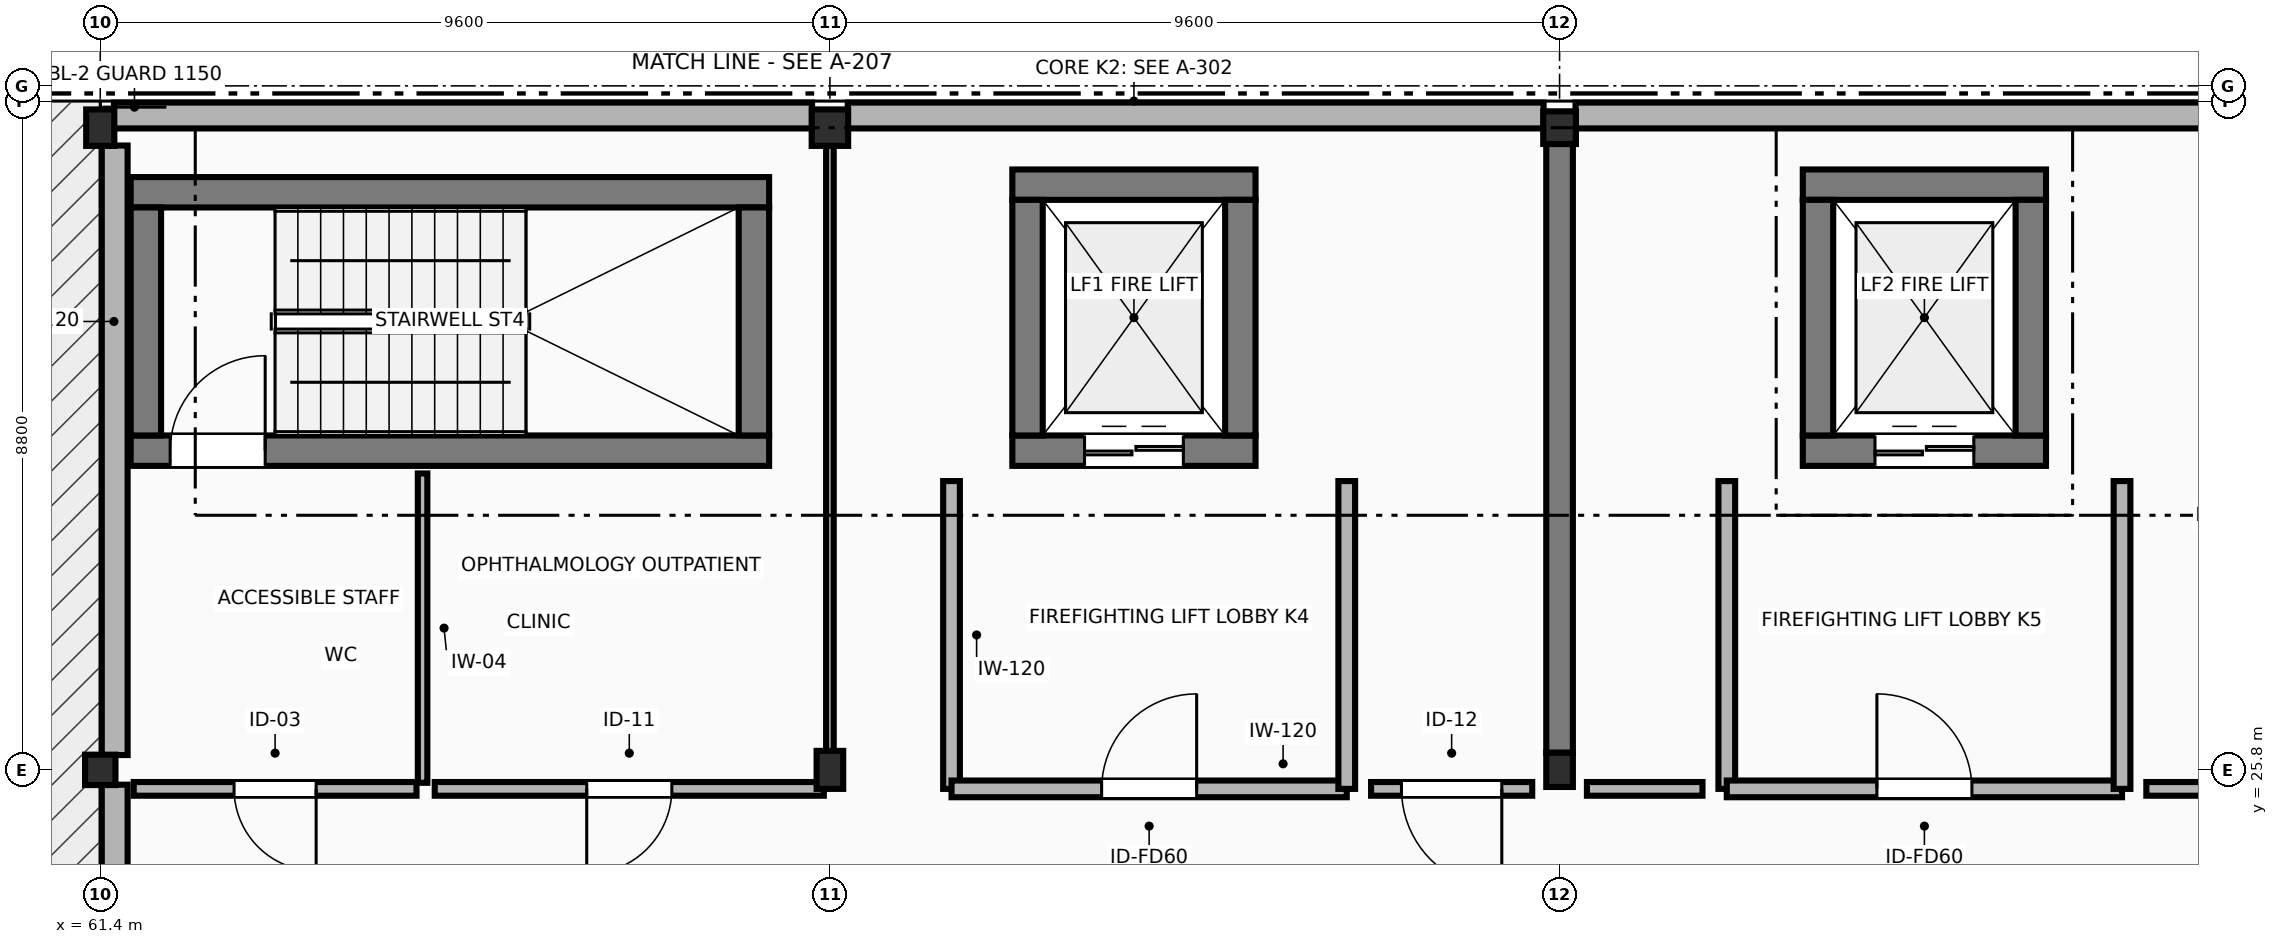
"""IFC4 building model, lengths in metres.
Left out: names, types, materials, properties, quantities, classifications, styles, units other than length and angle.
Written with IfcOpenShell. Run it as: python <this file> out.ifc"""

import sys

from ifc_helpers import new_model, si_unit, direction, frame, frame_2d, origin, origin_2d, place, context, subcontext, project, spatial, rectangle, extrude, element, fill, save


model = new_model("IFC4")
c1 = context("Model", 3, precision=1e-05, world=origin(), true_north=direction((0.0, 1.0)))
c2 = subcontext(c1, "Body", "Model", "MODEL_VIEW")
j1 = project(units=[si_unit("LENGTHUNIT", "METRE"), si_unit("PLANEANGLEUNIT", "RADIAN")], contexts=[c1])
p1 = place(None, origin())
s1 = spatial("IfcSite", under=j1, at=p1, CompositionType="ELEMENT")
p2 = place(p1, origin())
s2 = spatial("IfcBuilding", under=s1, at=p2, CompositionType="ELEMENT")
p3 = place(p2, frame((0.0, 0.0, 13.8)))
s3 = spatial("IfcBuildingStorey", under=s2, at=p3, CompositionType="ELEMENT", Elevation=13.8)
p4 = place(p3, frame((61.4, 25.8, 0.0), z_axis=(0.0, 0.0, 1.0), x_axis=(1.0, 0.0, 0.0)))
e1 = element("IfcColumn", 1, at=p4, inside=s3, PredefinedType="COLUMN", context=c2, shape_type="SweptSolid", body=[
    extrude(rectangle(XDim=0.4, YDim=0.4, at=origin_2d()), origin(), (0.0, 0.0, 1.0), 4.2),
])
p5 = place(p3, frame((61.4, 34.25, 0.0), z_axis=(0.0, 0.0, 1.0), x_axis=(1.0, 0.0, 0.0)))
e2 = element("IfcColumn", 2, at=p5, inside=s3, PredefinedType="COLUMN", context=c2, shape_type="SweptSolid", body=[
    extrude(rectangle(XDim=0.37, YDim=0.48, at=origin_2d()), origin(), (0.0, 0.0, 1.0), 4.2),
])
p6 = place(p3, frame((71.0, 25.8, 0.0), z_axis=(0.0, 0.0, 1.0), x_axis=(1.0, 0.0, 0.0)))
e3 = element("IfcColumn", 3, at=p6, inside=s3, PredefinedType="COLUMN", context=c2, shape_type="SweptSolid", body=[
    extrude(rectangle(XDim=0.35, YDim=0.5, at=origin_2d()), origin(), (0.0, 0.0, 1.0), 4.2),
])
p7 = place(p3, frame((71.0, 34.25, 0.0), z_axis=(0.0, 0.0, 1.0), x_axis=(1.0, 0.0, 0.0)))
e4 = element("IfcColumn", 4, at=p7, inside=s3, PredefinedType="COLUMN", context=c2, shape_type="SweptSolid", body=[
    extrude(rectangle(XDim=0.48, YDim=0.48, at=origin_2d()), origin(), (0.0, 0.0, 1.0), 4.2),
])
p8 = place(p3, frame((80.6, 25.8, 0.0), z_axis=(0.0, 0.0, 1.0), x_axis=(1.0, 0.0, 0.0)))
e5 = element("IfcColumn", 5, at=p8, inside=s3, PredefinedType="COLUMN", context=c2, shape_type="SweptSolid", body=[
    extrude(rectangle(XDim=0.35, YDim=0.45, at=origin_2d()), origin(), (0.0, 0.0, 1.0), 4.2),
])
p9 = place(p3, frame((80.6, 34.25, 0.0), z_axis=(0.0, 0.0, 1.0), x_axis=(1.0, 0.0, 0.0)))
e6 = element("IfcColumn", 6, at=p9, inside=s3, PredefinedType="COLUMN", context=c2, shape_type="SweptSolid", body=[
    extrude(rectangle(XDim=0.43, YDim=0.43, at=origin_2d()), origin(), (0.0, 0.0, 1.0), 4.2),
])
p10 = place(p3, frame((90.015, 34.41, 0.0), z_axis=(0.0, 0.0, 1.0), x_axis=(-1.0, 0.0, 0.0)))
e7 = element("IfcWall", 7, at=p10, inside=s3, PredefinedType="STANDARD", context=c2, shape_type="SweptSolid", body=[
    extrude(rectangle(XDim=9.205, YDim=0.34, at=frame_2d((4.603, 0.0))), origin(), (0.0, 0.0, 1.0), 3.185),
])
p11 = place(p3, frame((80.39, 34.41, 0.0), z_axis=(0.0, 0.0, 1.0), x_axis=(-1.0, 0.0, 0.0)))
e8 = element("IfcWall", 8, at=p11, inside=s3, PredefinedType="STANDARD", context=c2, shape_type="SweptSolid", body=[
    extrude(rectangle(XDim=9.155, YDim=0.34, at=frame_2d((4.577, 0.0))), origin(), (0.0, 0.0, 1.0), 3.185),
])
p12 = place(p3, frame((70.765, 34.41, 0.0), z_axis=(0.0, 0.0, 1.0), x_axis=(-1.0, 0.0, 0.0)))
e9 = element("IfcWall", 9, at=p12, inside=s3, PredefinedType="STANDARD", context=c2, shape_type="SweptSolid", body=[
    extrude(rectangle(XDim=9.185, YDim=0.34, at=frame_2d((4.592, 0.0))), origin(), (0.0, 0.0, 1.0), 3.185),
])
p13 = place(p3, frame((61.59, 34.015, 0.0), z_axis=(0.0, 0.0, 1.0), x_axis=(0.0, -1.0, 0.0)))
e10 = element("IfcWall", 10, at=p13, inside=s3, PredefinedType="STANDARD", context=c2, shape_type="SweptSolid", body=[
    extrude(rectangle(XDim=8.02, YDim=0.34, at=frame_2d((4.01, 0.0))), origin(), (0.0, 0.0, 1.0), 2.965),
])
p14 = place(p3, frame((61.59, 25.605, 0.0), z_axis=(0.0, 0.0, 1.0), x_axis=(0.0, -1.0, 0.0)))
e11 = element("IfcWall", 11, at=p14, inside=s3, PredefinedType="STANDARD", context=c2, shape_type="SweptSolid", body=[
    extrude(rectangle(XDim=8.22, YDim=0.34, at=frame_2d((4.11, 0.0))), origin(), (0.0, 0.0, 1.0), 2.965),
])
p15 = place(p3, frame((61.8, 30.0, 0.0), z_axis=(0.0, 0.0, 1.0), x_axis=(1.0, 0.0, 0.0)))
e12 = element("IfcWall", 12, at=p15, inside=s3, PredefinedType="SHEAR", context=c2, shape_type="SweptSolid", body=[
    extrude(rectangle(XDim=8.4, YDim=0.4, at=frame_2d((4.2, 0.0))), origin(), (0.0, 0.0, 1.0), 3.92),
])
p16 = place(p15, frame((0.52, 0.0, 0.0)))
e13 = element("IfcOpeningElement", 13, at=p16, cuts=e12, PredefinedType="OPENING", context=c2, shape_type="SweptSolid", body=[
    extrude(rectangle(XDim=1.25, YDim=2.2, at=frame_2d((0.625, 1.1))), frame((0.0, 0.21, 0.0), z_axis=(0.0, -1.0, 0.0), x_axis=(1.0, 0.0, 0.0)), (0.0, 0.0, 1.0), 0.42),
])
p17 = place(p3, frame((70.2, 33.4, 0.0), z_axis=(0.0, 0.0, 1.0), x_axis=(-1.0, 0.0, 0.0)))
e14 = element("IfcWall", 14, at=p17, inside=s3, PredefinedType="SHEAR", context=c2, shape_type="SweptSolid", body=[
    extrude(rectangle(XDim=8.4, YDim=0.4, at=frame_2d((4.2, 0.0))), origin(), (0.0, 0.0, 1.0), 3.92),
])
for number, where, z_axis, x_axis in (
    (15, (62.0, 30.2, 0.0), (0.0, 0.0, 1.0), (0.0, 1.0, 0.0)),
    (16, (70.0, 33.2, 0.0), (0.0, 0.0, 1.0), (0.0, -1.0, 0.0)),
):
    element("IfcWall", number, at=place(p3, frame(where, z_axis=z_axis, x_axis=x_axis)), inside=s3, PredefinedType="SHEAR", context=c2, shape_type="SweptSolid", body=[
        extrude(rectangle(XDim=3.0, YDim=0.4, at=frame_2d((1.5, 0.0))), origin(), (0.0, 0.0, 1.0), 3.92),
    ])
p18 = place(p3, frame((73.4, 30.0, 0.0), z_axis=(0.0, 0.0, 1.0), x_axis=(1.0, 0.0, 0.0)))
e17 = element("IfcWall", 17, at=p18, inside=s3, PredefinedType="SHEAR", context=c2, shape_type="SweptSolid", body=[
    extrude(rectangle(XDim=3.2, YDim=0.4, at=frame_2d((1.6, 0.0))), origin(), (0.0, 0.0, 1.0), 4.2),
])
p19 = place(p18, frame((0.95, 0.0, 0.0)))
e18 = element("IfcOpeningElement", 18, at=p19, cuts=e17, PredefinedType="OPENING", context=c2, shape_type="SweptSolid", body=[
    extrude(rectangle(XDim=1.3, YDim=2.25, at=frame_2d((0.65, 1.125))), frame((0.0, 0.21, 0.0), z_axis=(0.0, -1.0, 0.0), x_axis=(1.0, 0.0, 0.0)), (0.0, 0.0, 1.0), 0.42),
])
p20 = place(p3, frame((76.6, 33.5, 0.0), z_axis=(0.0, 0.0, 1.0), x_axis=(-1.0, 0.0, 0.0)))
e19 = element("IfcWall", 19, at=p20, inside=s3, PredefinedType="SHEAR", context=c2, shape_type="SweptSolid", body=[
    extrude(rectangle(XDim=3.2, YDim=0.4, at=frame_2d((1.6, 0.0))), origin(), (0.0, 0.0, 1.0), 4.2),
])
for number, where, z_axis, x_axis in (
    (20, (73.6, 30.2, 0.0), (0.0, 0.0, 1.0), (0.0, 1.0, 0.0)),
    (21, (76.4, 33.3, 0.0), (0.0, 0.0, 1.0), (0.0, -1.0, 0.0)),
):
    element("IfcWall", number, at=place(p3, frame(where, z_axis=z_axis, x_axis=x_axis)), inside=s3, PredefinedType="SHEAR", context=c2, shape_type="SweptSolid", body=[
        extrude(rectangle(XDim=3.1, YDim=0.4, at=frame_2d((1.55, 0.0))), origin(), (0.0, 0.0, 1.0), 4.2),
    ])
p21 = place(p3, frame((72.6, 29.6, 0.0), z_axis=(0.0, 0.0, 1.0), x_axis=(0.0, -1.0, 0.0)))
e22 = element("IfcWall", 22, at=p21, inside=s3, PredefinedType="PARTITIONING", context=c2, shape_type="SweptSolid", body=[
    extrude(rectangle(XDim=4.05, YDim=0.22, at=frame_2d((2.025, 0.0))), origin(), (0.0, 0.0, 1.0), 3.92),
])
p22 = place(p3, frame((72.6, 25.55, 0.0), z_axis=(0.0, 0.0, 1.0), x_axis=(1.0, 0.0, 0.0)))
e23 = element("IfcWall", 23, at=p22, inside=s3, PredefinedType="PARTITIONING", context=c2, shape_type="SweptSolid", body=[
    extrude(rectangle(XDim=5.2, YDim=0.22, at=frame_2d((2.6, 0.0))), origin(), (0.0, 0.0, 1.0), 3.225),
])
p23 = place(p22, frame((1.975, 0.0, 0.0)))
e24 = element("IfcOpeningElement", 24, at=p23, cuts=e23, PredefinedType="OPENING", context=c2, shape_type="SweptSolid", body=[
    extrude(rectangle(XDim=1.25, YDim=2.2, at=frame_2d((0.625, 1.1))), frame((0.0, 0.12, 0.0), z_axis=(0.0, -1.0, 0.0), x_axis=(1.0, 0.0, 0.0)), (0.0, 0.0, 1.0), 0.24),
])
p24 = place(p3, frame((77.8, 25.55, 0.0), z_axis=(0.0, 0.0, 1.0), x_axis=(0.0, 1.0, 0.0)))
e25 = element("IfcWall", 25, at=p24, inside=s3, PredefinedType="PARTITIONING", context=c2, shape_type="SweptSolid", body=[
    extrude(rectangle(XDim=4.05, YDim=0.22, at=frame_2d((2.025, 0.0))), origin(), (0.0, 0.0, 1.0), 3.643),
])
p25 = place(p3, frame((83.8, 30.0, 0.0), z_axis=(0.0, 0.0, 1.0), x_axis=(1.0, 0.0, 0.0)))
e26 = element("IfcWall", 26, at=p25, inside=s3, PredefinedType="SHEAR", context=c2, shape_type="SweptSolid", body=[
    extrude(rectangle(XDim=3.2, YDim=0.4, at=frame_2d((1.6, 0.0))), origin(), (0.0, 0.0, 1.0), 4.2),
])
p26 = place(p25, frame((0.95, 0.0, 0.0)))
e27 = element("IfcOpeningElement", 27, at=p26, cuts=e26, PredefinedType="OPENING", context=c2, shape_type="SweptSolid", body=[
    extrude(rectangle(XDim=1.3, YDim=2.25, at=frame_2d((0.65, 1.125))), frame((0.0, 0.21, 0.0), z_axis=(0.0, -1.0, 0.0), x_axis=(1.0, 0.0, 0.0)), (0.0, 0.0, 1.0), 0.42),
])
p27 = place(p3, frame((87.0, 33.5, 0.0), z_axis=(0.0, 0.0, 1.0), x_axis=(-1.0, 0.0, 0.0)))
e28 = element("IfcWall", 28, at=p27, inside=s3, PredefinedType="SHEAR", context=c2, shape_type="SweptSolid", body=[
    extrude(rectangle(XDim=3.2, YDim=0.4, at=frame_2d((1.6, 0.0))), origin(), (0.0, 0.0, 1.0), 4.2),
])
for number, where, z_axis, x_axis in (
    (29, (84.0, 30.2, 0.0), (0.0, 0.0, 1.0), (0.0, 1.0, 0.0)),
    (30, (86.8, 33.3, 0.0), (0.0, 0.0, 1.0), (0.0, -1.0, 0.0)),
):
    element("IfcWall", number, at=place(p3, frame(where, z_axis=z_axis, x_axis=x_axis)), inside=s3, PredefinedType="SHEAR", context=c2, shape_type="SweptSolid", body=[
        extrude(rectangle(XDim=3.1, YDim=0.4, at=frame_2d((1.55, 0.0))), origin(), (0.0, 0.0, 1.0), 4.2),
    ])
p28 = place(p3, frame((82.8, 29.6, 0.0), z_axis=(0.0, 0.0, 1.0), x_axis=(0.0, -1.0, 0.0)))
e31 = element("IfcWall", 31, at=p28, inside=s3, PredefinedType="PARTITIONING", context=c2, shape_type="SweptSolid", body=[
    extrude(rectangle(XDim=4.05, YDim=0.22, at=frame_2d((2.025, 0.0))), origin(), (0.0, 0.0, 1.0), 3.92),
])
p29 = place(p3, frame((82.8, 25.55, 0.0), z_axis=(0.0, 0.0, 1.0), x_axis=(1.0, 0.0, 0.0)))
e32 = element("IfcWall", 32, at=p29, inside=s3, PredefinedType="PARTITIONING", context=c2, shape_type="SweptSolid", body=[
    extrude(rectangle(XDim=5.2, YDim=0.22, at=frame_2d((2.6, 0.0))), origin(), (0.0, 0.0, 1.0), 3.225),
])
p30 = place(p29, frame((1.975, 0.0, 0.0)))
e33 = element("IfcOpeningElement", 33, at=p30, cuts=e32, PredefinedType="OPENING", context=c2, shape_type="SweptSolid", body=[
    extrude(rectangle(XDim=1.25, YDim=2.2, at=frame_2d((0.625, 1.1))), frame((0.0, 0.12, 0.0), z_axis=(0.0, -1.0, 0.0), x_axis=(1.0, 0.0, 0.0)), (0.0, 0.0, 1.0), 0.24),
])
p31 = place(p3, frame((88.0, 25.55, 0.0), z_axis=(0.0, 0.0, 1.0), x_axis=(0.0, 1.0, 0.0)))
e34 = element("IfcWall", 34, at=p31, inside=s3, PredefinedType="PARTITIONING", context=c2, shape_type="SweptSolid", body=[
    extrude(rectangle(XDim=4.05, YDim=0.22, at=frame_2d((2.025, 0.0))), origin(), (0.0, 0.0, 1.0), 3.92),
])
p32 = place(p3, frame((80.6, 26.025, 0.0), z_axis=(0.0, 0.0, 1.0), x_axis=(0.0, 1.0, 0.0)))
e35 = element("IfcWall", 35, at=p32, inside=s3, PredefinedType="SHEAR", context=c2, shape_type="SweptSolid", body=[
    extrude(rectangle(XDim=8.01, YDim=0.35, at=frame_2d((4.005, 0.0))), origin(), (0.0, 0.0, 1.0), 3.92),
])
p33 = place(p3, frame((65.641, 29.7, 0.0), z_axis=(0.0, 0.0, 1.0), x_axis=(0.0, -1.0, 0.0)))
e36 = element("IfcWall", 36, at=p33, inside=s3, PredefinedType="PARTITIONING", context=c2, shape_type="SweptSolid", body=[
    extrude(rectangle(XDim=4.07, YDim=0.125, at=frame_2d((2.035, 0.0))), origin(), (0.0, 0.0, 1.0), 3.92),
])
p34 = place(p3, frame((65.561, 25.55, 0.0), z_axis=(0.0, 0.0, 1.0), x_axis=(-1.0, 0.0, 0.0)))
e37 = element("IfcWall", 37, at=p34, inside=s3, PredefinedType="PARTITIONING", context=c2, shape_type="SweptSolid", body=[
    extrude(rectangle(XDim=3.721, YDim=0.18, at=frame_2d((1.86, 0.0))), origin(), (0.0, 0.0, 1.0), 3.225),
])
p35 = place(p34, frame((1.32, 0.0, 0.0)))
e38 = element("IfcOpeningElement", 38, at=p35, cuts=e37, PredefinedType="OPENING", context=c2, shape_type="SweptSolid", body=[
    extrude(rectangle(XDim=1.08, YDim=2.2, at=frame_2d((0.54, 1.1))), frame((0.0, 0.1, 0.0), z_axis=(0.0, -1.0, 0.0), x_axis=(1.0, 0.0, 0.0)), (0.0, 0.0, 1.0), 0.2),
])
p36 = place(p3, frame((71.0, 34.16, 0.0), z_axis=(0.0, 0.0, 1.0), x_axis=(0.0, -1.0, 0.0)))
e39 = element("IfcWall", 39, at=p36, inside=s3, PredefinedType="PARTITIONING", context=c2, shape_type="SweptSolid", body=[
    extrude(rectangle(XDim=8.53, YDim=0.1, at=frame_2d((4.265, 0.0))), origin(), (0.0, 0.0, 1.0), 3.405),
])
p37 = place(p3, frame((70.92, 25.55, 0.0), z_axis=(0.0, 0.0, 1.0), x_axis=(-1.0, 0.0, 0.0)))
e40 = element("IfcWall", 40, at=p37, inside=s3, PredefinedType="PARTITIONING", context=c2, shape_type="SweptSolid", body=[
    extrude(rectangle(XDim=5.119, YDim=0.18, at=frame_2d((2.56, 0.0))), origin(), (0.0, 0.0, 1.0), 3.225),
])
p38 = place(p37, frame((2.0, 0.0, 0.0)))
e41 = element("IfcOpeningElement", 41, at=p38, cuts=e40, PredefinedType="OPENING", context=c2, shape_type="SweptSolid", body=[
    extrude(rectangle(XDim=1.12, YDim=2.16, at=frame_2d((0.56, 1.08))), frame((0.0, 0.1, 0.0), z_axis=(0.0, -1.0, 0.0), x_axis=(1.0, 0.0, 0.0)), (0.0, 0.0, 1.0), 0.2),
])
p39 = place(p3, frame((80.24, 25.55, 0.0), z_axis=(0.0, 0.0, 1.0), x_axis=(-1.0, 0.0, 0.0)))
e42 = element("IfcWall", 42, at=p39, inside=s3, PredefinedType="PARTITIONING", context=c2, shape_type="SweptSolid", body=[
    extrude(rectangle(XDim=2.12, YDim=0.18, at=frame_2d((1.06, 0.0))), origin(), (0.0, 0.0, 1.0), 3.225),
])
p40 = place(p39, frame((0.4, 0.0, 0.0)))
e43 = element("IfcOpeningElement", 43, at=p40, cuts=e42, PredefinedType="OPENING", context=c2, shape_type="SweptSolid", body=[
    extrude(rectangle(XDim=1.32, YDim=2.22, at=frame_2d((0.66, 1.11))), frame((0.0, 0.1, 0.0), z_axis=(0.0, -1.0, 0.0), x_axis=(1.0, 0.0, 0.0)), (0.0, 0.0, 1.0), 0.2),
])
p41 = place(p3, frame((82.48, 25.55, 0.0), z_axis=(0.0, 0.0, 1.0), x_axis=(-1.0, 0.0, 0.0)))
e44 = element("IfcWall", 44, at=p41, inside=s3, PredefinedType="PARTITIONING", context=c2, shape_type="SweptSolid", body=[
    extrude(rectangle(XDim=1.52, YDim=0.18, at=frame_2d((0.76, 0.0))), origin(), (0.0, 0.0, 1.0), 3.225),
])
p42 = place(p3, frame((90.1, 25.55, 0.0), z_axis=(0.0, 0.0, 1.0), x_axis=(-1.0, 0.0, 0.0)))
e45 = element("IfcWall", 45, at=p42, inside=s3, PredefinedType="PARTITIONING", context=c2, shape_type="SweptSolid", body=[
    extrude(rectangle(XDim=1.78, YDim=0.18, at=frame_2d((0.89, 0.0))), origin(), (0.0, 0.0, 1.0), 3.225),
])
p43 = place(p16, origin())
e46 = element("IfcDoor", 46, at=p43, inside=s3, OperationType="SINGLE_SWING_RIGHT", PredefinedType="DOOR", context=c2, shape_type="SweptSolid", body=[
    extrude(rectangle(XDim=1.25, YDim=2.2, at=frame_2d((0.625, 1.1))), frame((0.0, 0.025, 0.0), z_axis=(0.0, -1.0, 0.0), x_axis=(1.0, 0.0, 0.0)), (0.0, 0.0, 1.0), 0.05),
])
fill(e13, e46)
p44 = place(p19, origin())
e47 = element("IfcDoor", 47, at=p44, inside=s3, OperationType="DOUBLE_DOOR_SLIDING", PredefinedType="DOOR", context=c2, shape_type="SweptSolid", body=[
    extrude(rectangle(XDim=1.3, YDim=2.25, at=frame_2d((0.65, 1.125))), frame((0.0, 0.025, 0.0), z_axis=(0.0, -1.0, 0.0), x_axis=(1.0, 0.0, 0.0)), (0.0, 0.0, 1.0), 0.05),
])
fill(e18, e47)
p45 = place(p23, origin())
e48 = element("IfcDoor", 48, at=p45, inside=s3, OperationType="SINGLE_SWING_RIGHT", PredefinedType="DOOR", context=c2, shape_type="SweptSolid", body=[
    extrude(rectangle(XDim=1.25, YDim=2.2, at=frame_2d((0.625, 1.1))), frame((0.0, 0.025, 0.0), z_axis=(0.0, -1.0, 0.0), x_axis=(1.0, 0.0, 0.0)), (0.0, 0.0, 1.0), 0.05),
])
fill(e24, e48)
p46 = place(p26, origin())
e49 = element("IfcDoor", 49, at=p46, inside=s3, OperationType="DOUBLE_DOOR_SLIDING", PredefinedType="DOOR", context=c2, shape_type="SweptSolid", body=[
    extrude(rectangle(XDim=1.3, YDim=2.25, at=frame_2d((0.65, 1.125))), frame((0.0, 0.025, 0.0), z_axis=(0.0, -1.0, 0.0), x_axis=(1.0, 0.0, 0.0)), (0.0, 0.0, 1.0), 0.05),
])
fill(e27, e49)
p47 = place(p30, origin())
e50 = element("IfcDoor", 50, at=p47, inside=s3, OperationType="SINGLE_SWING_LEFT", PredefinedType="DOOR", context=c2, shape_type="SweptSolid", body=[
    extrude(rectangle(XDim=1.25, YDim=2.2, at=frame_2d((0.625, 1.1))), frame((0.0, 0.025, 0.0), z_axis=(0.0, -1.0, 0.0), x_axis=(1.0, 0.0, 0.0)), (0.0, 0.0, 1.0), 0.05),
])
fill(e33, e50)
p48 = place(p35, origin())
e51 = element("IfcDoor", 51, at=p48, inside=s3, OperationType="SINGLE_SWING_LEFT", PredefinedType="DOOR", context=c2, shape_type="SweptSolid", body=[
    extrude(rectangle(XDim=1.08, YDim=2.2, at=frame_2d((0.54, 1.1))), frame((0.0, 0.025, 0.0), z_axis=(0.0, -1.0, 0.0), x_axis=(1.0, 0.0, 0.0)), (0.0, 0.0, 1.0), 0.05),
])
fill(e38, e51)
p49 = place(p38, origin())
e52 = element("IfcDoor", 52, at=p49, inside=s3, OperationType="SINGLE_SWING_RIGHT", PredefinedType="DOOR", context=c2, shape_type="SweptSolid", body=[
    extrude(rectangle(XDim=1.12, YDim=2.16, at=frame_2d((0.56, 1.08))), frame((0.0, 0.025, 0.0), z_axis=(0.0, -1.0, 0.0), x_axis=(1.0, 0.0, 0.0)), (0.0, 0.0, 1.0), 0.05),
])
fill(e41, e52)
p50 = place(p40, origin())
e53 = element("IfcDoor", 53, at=p50, inside=s3, OperationType="SINGLE_SWING_LEFT", PredefinedType="DOOR", context=c2, shape_type="SweptSolid", body=[
    extrude(rectangle(XDim=1.32, YDim=2.22, at=frame_2d((0.66, 1.11))), frame((0.0, 0.025, 0.0), z_axis=(0.0, -1.0, 0.0), x_axis=(1.0, 0.0, 0.0)), (0.0, 0.0, 1.0), 0.05),
])
fill(e43, e53)
save(model, sys.argv[1])
